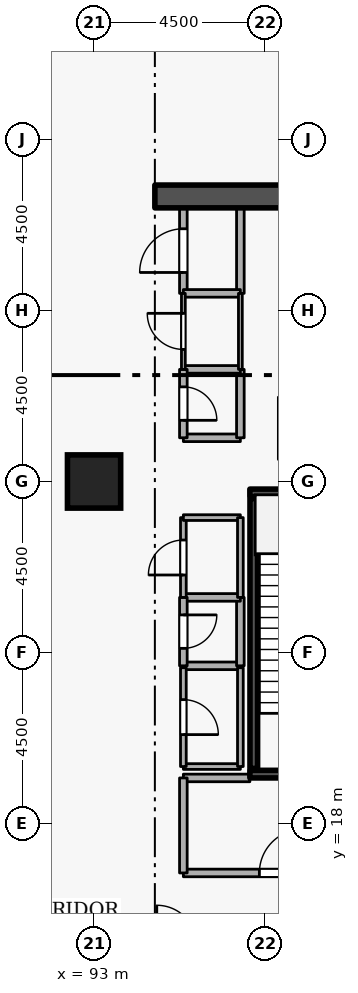
"""IFC4 building model, lengths in metres.
Left out: names, types, materials, properties, quantities, classifications, styles, units other than length and angle.
Written with IfcOpenShell. Run it as: python <this file> out.ifc"""

import sys

from ifc_helpers import new_model, si_unit, direction, frame, frame_2d, origin, origin_2d, place, context, subcontext, project, spatial, rectangle, extrude, element, fill, save


model = new_model("IFC4")
c1 = context("Model", 3, precision=1e-05, world=origin(), true_north=direction((0.0, 1.0)))
c2 = subcontext(c1, "Body", "Model", "MODEL_VIEW")
j1 = project(units=[si_unit("LENGTHUNIT", "METRE"), si_unit("PLANEANGLEUNIT", "RADIAN")], contexts=[c1])
p1 = place(None, origin())
s1 = spatial("IfcSite", under=j1, at=p1, CompositionType="ELEMENT")
p2 = place(p1, origin())
s2 = spatial("IfcBuilding", under=s1, at=p2, CompositionType="ELEMENT")
p3 = place(p2, frame((0.0, 0.0, -5.4)))
s3 = spatial("IfcBuildingStorey", under=s2, at=p3, CompositionType="ELEMENT", Elevation=-5.4)
p4 = place(p3, frame((94.6, 34.5, -0.6), z_axis=(0.0, 0.0, 1.0), x_axis=(1.0, 0.0, 0.0)))
e1 = element("IfcWall", 1, at=p4, inside=s3, PredefinedType="SHEAR", context=c2, shape_type="SweptSolid", body=[
    extrude(rectangle(XDim=5.7, YDim=0.6, at=frame_2d((2.85, 0.0))), origin(), (0.0, 0.0, 1.0), 6.0),
])
p5 = place(p3, frame((93.0, 27.0, -0.6), z_axis=(0.0, 0.0, 1.0), x_axis=(1.0, 0.0, 0.0)))
e2 = element("IfcColumn", 2, at=p5, inside=s3, PredefinedType="COLUMN", context=c2, shape_type="SweptSolid", body=[
    extrude(rectangle(XDim=1.4, YDim=1.4, at=origin_2d()), origin(), (0.0, 0.0, 1.0), 6.0),
])
p6 = place(p3, frame((97.95, 29.22, 0.0), z_axis=(0.0, 0.0, 1.0), x_axis=(0.0, -1.0, 0.0)))
e3 = element("IfcWall", 3, at=p6, inside=s3, PredefinedType="STANDARD", context=c2, shape_type="SweptSolid", body=[
    extrude(rectangle(XDim=1.64, YDim=0.2, at=frame_2d((0.82, 0.0))), origin(), (0.0, 0.0, 1.0), 5.06),
])
p7 = place(p6, frame((0.31, 0.0, 0.0)))
e4 = element("IfcOpeningElement", 4, at=p7, cuts=e3, PredefinedType="OPENING", context=c2, shape_type="SweptSolid", body=[
    extrude(rectangle(XDim=1.02, YDim=2.06, at=frame_2d((0.51, 1.03))), frame((0.0, 0.11, 0.0), z_axis=(0.0, -1.0, 0.0), x_axis=(1.0, 0.0, 0.0)), (0.0, 0.0, 1.0), 0.22),
])
p8 = place(p3, frame((100.45, 19.3, -0.6), z_axis=(0.0, 0.0, 1.0), x_axis=(-1.0, 0.0, 0.0)))
e5 = element("IfcWall", 5, at=p8, inside=s3, PredefinedType="SHEAR", context=c2, shape_type="SweptSolid", body=[
    extrude(rectangle(XDim=3.35, YDim=0.2, at=frame_2d((1.675, 0.0))), origin(), (0.0, 0.0, 1.0), 6.0),
])
p9 = place(p8, frame((1.125, 0.0, 0.6)))
e6 = element("IfcOpeningElement", 6, at=p9, cuts=e5, PredefinedType="OPENING", context=c2, shape_type="SweptSolid", body=[
    extrude(rectangle(XDim=1.1, YDim=2.1, at=frame_2d((0.55, 1.05))), frame((0.0, 0.11, 0.0), z_axis=(0.0, -1.0, 0.0), x_axis=(1.0, 0.0, 0.0)), (0.0, 0.0, 1.0), 0.22),
])
p10 = place(p3, frame((97.1, 26.7, -0.6), z_axis=(0.0, 0.0, 1.0), x_axis=(1.0, 0.0, 0.0)))
e7 = element("IfcWall", 7, at=p10, inside=s3, PredefinedType="SHEAR", context=c2, shape_type="SweptSolid", body=[
    extrude(rectangle(XDim=3.35, YDim=0.2, at=frame_2d((1.675, 0.0))), origin(), (0.0, 0.0, 1.0), 6.0),
])
p11 = place(p3, frame((97.203, 26.55, -0.6), z_axis=(0.0, 0.0, 1.0), x_axis=(0.0, -1.0, 0.0)))
e8 = element("IfcWall", 8, at=p11, inside=s3, PredefinedType="SHEAR", context=c2, shape_type="SweptSolid", body=[
    extrude(rectangle(XDim=7.1, YDim=0.2, at=frame_2d((3.55, 0.0))), origin(), (0.0, 0.0, 1.0), 6.0),
])
p12 = place(p3, frame((95.35, 16.7, 0.0), z_axis=(0.0, 0.0, 1.0), x_axis=(1.0, 0.0, 0.0)))
e9 = element("IfcWall", 9, at=p12, inside=s3, PredefinedType="STANDARD", context=c2, shape_type="SweptSolid", body=[
    extrude(rectangle(XDim=5.15, YDim=0.2, at=frame_2d((2.575, 0.0))), origin(), (0.0, 0.0, 1.0), 5.06),
])
p13 = place(p12, frame((2.0, 0.0, 0.0)))
e10 = element("IfcOpeningElement", 10, at=p13, cuts=e9, PredefinedType="OPENING", context=c2, shape_type="SweptSolid", body=[
    extrude(rectangle(XDim=1.15, YDim=2.1, at=frame_2d((0.575, 1.05))), frame((0.0, 0.11, 0.0), z_axis=(0.0, -1.0, 0.0), x_axis=(1.0, 0.0, 0.0)), (0.0, 0.0, 1.0), 0.22),
])
p14 = place(p3, frame((97.1, 19.2, 0.0), z_axis=(0.0, 0.0, 1.0), x_axis=(-1.0, 0.0, 0.0)))
e11 = element("IfcWall", 11, at=p14, inside=s3, PredefinedType="STANDARD", context=c2, shape_type="SweptSolid", body=[
    extrude(rectangle(XDim=1.75, YDim=0.2, at=frame_2d((0.875, 0.0))), origin(), (0.0, 0.0, 1.0), 4.265),
])
p15 = place(p3, frame((95.35, 19.2, 0.0), z_axis=(0.0, 0.0, 1.0), x_axis=(0.0, -1.0, 0.0)))
e12 = element("IfcWall", 12, at=p15, inside=s3, PredefinedType="STANDARD", context=c2, shape_type="SweptSolid", body=[
    extrude(rectangle(XDim=2.5, YDim=0.2, at=frame_2d((1.25, 0.0))), origin(), (0.0, 0.0, 1.0), 5.06),
])
p16 = place(p3, frame((95.35, 28.15, 0.0), z_axis=(0.0, 0.0, 1.0), x_axis=(1.0, 0.0, 0.0)))
e13 = element("IfcWall", 13, at=p16, inside=s3, PredefinedType="STANDARD", context=c2, shape_type="SweptSolid", body=[
    extrude(rectangle(XDim=1.5, YDim=0.2, at=frame_2d((0.75, 0.0))), origin(), (0.0, 0.0, 1.0), 5.06),
])
p17 = place(p3, frame((96.85, 28.15, 0.0), z_axis=(0.0, 0.0, 1.0), x_axis=(0.0, 1.0, 0.0)))
e14 = element("IfcWall", 14, at=p17, inside=s3, PredefinedType="STANDARD", context=c2, shape_type="SweptSolid", body=[
    extrude(rectangle(XDim=1.8, YDim=0.2, at=frame_2d((0.9, 0.0))), origin(), (0.0, 0.0, 1.0), 5.06),
])
p18 = place(p3, frame((96.85, 29.95, 0.0), z_axis=(0.0, 0.0, 1.0), x_axis=(-1.0, 0.0, 0.0)))
e15 = element("IfcWall", 15, at=p18, inside=s3, PredefinedType="STANDARD", context=c2, shape_type="SweptSolid", body=[
    extrude(rectangle(XDim=1.5, YDim=0.2, at=frame_2d((0.75, 0.0))), origin(), (0.0, 0.0, 1.0), 5.06),
])
p19 = place(p3, frame((95.35, 29.95, 0.0), z_axis=(0.0, 0.0, 1.0), x_axis=(0.0, -1.0, 0.0)))
e16 = element("IfcWall", 16, at=p19, inside=s3, PredefinedType="STANDARD", context=c2, shape_type="SweptSolid", body=[
    extrude(rectangle(XDim=1.8, YDim=0.2, at=frame_2d((0.9, 0.0))), origin(), (0.0, 0.0, 1.0), 5.06),
])
p20 = place(p19, frame((0.46, 0.0, 0.0)))
e17 = element("IfcOpeningElement", 17, at=p20, cuts=e16, PredefinedType="OPENING", context=c2, shape_type="SweptSolid", body=[
    extrude(rectangle(XDim=0.88, YDim=2.04, at=frame_2d((0.44, 1.02))), frame((0.0, 0.11, 0.0), z_axis=(0.0, -1.0, 0.0), x_axis=(1.0, 0.0, 0.0)), (0.0, 0.0, 1.0), 0.22),
])
p21 = place(p3, frame((95.35, 22.15, 0.0), z_axis=(0.0, 0.0, 1.0), x_axis=(1.0, 0.0, 0.0)))
e18 = element("IfcWall", 18, at=p21, inside=s3, PredefinedType="STANDARD", context=c2, shape_type="SweptSolid", body=[
    extrude(rectangle(XDim=1.5, YDim=0.2, at=frame_2d((0.75, 0.0))), origin(), (0.0, 0.0, 1.0), 5.06),
])
p22 = place(p3, frame((96.85, 22.15, 0.0), z_axis=(0.0, 0.0, 1.0), x_axis=(0.0, 1.0, 0.0)))
e19 = element("IfcWall", 19, at=p22, inside=s3, PredefinedType="STANDARD", context=c2, shape_type="SweptSolid", body=[
    extrude(rectangle(XDim=1.8, YDim=0.2, at=frame_2d((0.9, 0.0))), origin(), (0.0, 0.0, 1.0), 5.06),
])
p23 = place(p3, frame((96.85, 23.95, 0.0), z_axis=(0.0, 0.0, 1.0), x_axis=(-1.0, 0.0, 0.0)))
e20 = element("IfcWall", 20, at=p23, inside=s3, PredefinedType="STANDARD", context=c2, shape_type="SweptSolid", body=[
    extrude(rectangle(XDim=1.5, YDim=0.2, at=frame_2d((0.75, 0.0))), origin(), (0.0, 0.0, 1.0), 5.06),
])
p24 = place(p3, frame((95.35, 23.95, 0.0), z_axis=(0.0, 0.0, 1.0), x_axis=(0.0, -1.0, 0.0)))
e21 = element("IfcWall", 21, at=p24, inside=s3, PredefinedType="STANDARD", context=c2, shape_type="SweptSolid", body=[
    extrude(rectangle(XDim=1.8, YDim=0.2, at=frame_2d((0.9, 0.0))), origin(), (0.0, 0.0, 1.0), 5.06),
])
p25 = place(p24, frame((0.46, 0.0, 0.0)))
e22 = element("IfcOpeningElement", 22, at=p25, cuts=e21, PredefinedType="OPENING", context=c2, shape_type="SweptSolid", body=[
    extrude(rectangle(XDim=0.88, YDim=2.04, at=frame_2d((0.44, 1.02))), frame((0.0, 0.11, 0.0), z_axis=(0.0, -1.0, 0.0), x_axis=(1.0, 0.0, 0.0)), (0.0, 0.0, 1.0), 0.22),
])
p26 = place(p3, frame((95.35, 31.95, 0.0), z_axis=(0.0, 0.0, 1.0), x_axis=(0.0, 1.0, 0.0)))
e23 = element("IfcWall", 23, at=p26, inside=s3, PredefinedType="STANDARD", context=c2, shape_type="SweptSolid", body=[
    extrude(rectangle(XDim=2.25, YDim=0.2, at=frame_2d((1.125, 0.0))), origin(), (0.0, 0.0, 1.0), 5.06),
])
p27 = place(p26, frame((0.55, 0.0, 0.0)))
e24 = element("IfcOpeningElement", 24, at=p27, cuts=e23, PredefinedType="OPENING", context=c2, shape_type="SweptSolid", body=[
    extrude(rectangle(XDim=1.15, YDim=2.1, at=frame_2d((0.575, 1.05))), frame((0.0, 0.11, 0.0), z_axis=(0.0, -1.0, 0.0), x_axis=(1.0, 0.0, 0.0)), (0.0, 0.0, 1.0), 0.22),
])
p28 = place(p3, frame((96.85, 34.2, 0.0), z_axis=(0.0, 0.0, 1.0), x_axis=(0.0, -1.0, 0.0)))
e25 = element("IfcWall", 25, at=p28, inside=s3, PredefinedType="STANDARD", context=c2, shape_type="SweptSolid", body=[
    extrude(rectangle(XDim=2.25, YDim=0.2, at=frame_2d((1.125, 0.0))), origin(), (0.0, 0.0, 1.0), 5.06),
])
p29 = place(p3, frame((96.85, 31.95, 0.0), z_axis=(0.0, 0.0, 1.0), x_axis=(-1.0, 0.0, 0.0)))
e26 = element("IfcWall", 26, at=p29, inside=s3, PredefinedType="STANDARD", context=c2, shape_type="SweptSolid", body=[
    extrude(rectangle(XDim=1.5, YDim=0.2, at=frame_2d((0.75, 0.0))), origin(), (0.0, 0.0, 1.0), 5.06),
])
p30 = place(p3, frame((95.35, 19.5, 0.0), z_axis=(0.0, 0.0, 1.0), x_axis=(1.0, 0.0, 0.0)))
e27 = element("IfcWall", 27, at=p30, inside=s3, PredefinedType="PARTITIONING", context=c2, shape_type="SweptSolid", body=[
    extrude(rectangle(XDim=1.5, YDim=0.15, at=frame_2d((0.75, 0.0))), origin(), (0.0, 0.0, 1.0), 4.265),
])
p31 = place(p3, frame((96.85, 19.5, 0.0), z_axis=(0.0, 0.0, 1.0), x_axis=(0.0, 1.0, 0.0)))
e28 = element("IfcWall", 28, at=p31, inside=s3, PredefinedType="PARTITIONING", context=c2, shape_type="SweptSolid", body=[
    extrude(rectangle(XDim=2.6, YDim=0.15, at=frame_2d((1.3, 0.0))), origin(), (0.0, 0.0, 1.0), 5.06),
])
p32 = place(p3, frame((95.35, 22.1, 0.0), z_axis=(0.0, 0.0, 1.0), x_axis=(0.0, -1.0, 0.0)))
e29 = element("IfcWall", 29, at=p32, inside=s3, PredefinedType="PARTITIONING", context=c2, shape_type="SweptSolid", body=[
    extrude(rectangle(XDim=2.6, YDim=0.15, at=frame_2d((1.3, 0.0))), origin(), (0.0, 0.0, 1.0), 5.06),
])
p33 = place(p32, frame((0.84, 0.0, 0.0)))
e30 = element("IfcOpeningElement", 30, at=p33, cuts=e29, PredefinedType="OPENING", context=c2, shape_type="SweptSolid", body=[
    extrude(rectangle(XDim=0.92, YDim=2.08, at=frame_2d((0.46, 1.04))), frame((0.0, 0.085, 0.0), z_axis=(0.0, -1.0, 0.0), x_axis=(1.0, 0.0, 0.0)), (0.0, 0.0, 1.0), 0.17),
])
p34 = place(p3, frame((95.35, 23.95, 0.0), z_axis=(0.0, 0.0, 1.0), x_axis=(0.0, 1.0, 0.0)))
e31 = element("IfcWall", 31, at=p34, inside=s3, PredefinedType="PARTITIONING", context=c2, shape_type="SweptSolid", body=[
    extrude(rectangle(XDim=2.1, YDim=0.15, at=frame_2d((1.05, 0.0))), origin(), (0.0, 0.0, 1.0), 5.06),
])
p35 = place(p34, frame((0.59, 0.0, 0.0)))
e32 = element("IfcOpeningElement", 32, at=p35, cuts=e31, PredefinedType="OPENING", context=c2, shape_type="SweptSolid", body=[
    extrude(rectangle(XDim=0.92, YDim=2.08, at=frame_2d((0.46, 1.04))), frame((0.0, 0.085, 0.0), z_axis=(0.0, -1.0, 0.0), x_axis=(1.0, 0.0, 0.0)), (0.0, 0.0, 1.0), 0.17),
])
p36 = place(p3, frame((95.35, 26.05, 0.0), z_axis=(0.0, 0.0, 1.0), x_axis=(1.0, 0.0, 0.0)))
e33 = element("IfcWall", 33, at=p36, inside=s3, PredefinedType="PARTITIONING", context=c2, shape_type="SweptSolid", body=[
    extrude(rectangle(XDim=1.5, YDim=0.15, at=frame_2d((0.75, 0.0))), origin(), (0.0, 0.0, 1.0), 5.06),
])
p37 = place(p3, frame((96.85, 26.05, 0.0), z_axis=(0.0, 0.0, 1.0), x_axis=(0.0, -1.0, 0.0)))
e34 = element("IfcWall", 34, at=p37, inside=s3, PredefinedType="PARTITIONING", context=c2, shape_type="SweptSolid", body=[
    extrude(rectangle(XDim=2.1, YDim=0.15, at=frame_2d((1.05, 0.0))), origin(), (0.0, 0.0, 1.0), 5.06),
])
p38 = place(p3, frame((95.35, 29.95, 0.0), z_axis=(0.0, 0.0, 1.0), x_axis=(0.0, 1.0, 0.0)))
e35 = element("IfcWall", 35, at=p38, inside=s3, PredefinedType="PARTITIONING", context=c2, shape_type="SweptSolid", body=[
    extrude(rectangle(XDim=2.0, YDim=0.1, at=frame_2d((1.0, 0.0))), origin(), (0.0, 0.0, 1.0), 5.06),
])
p39 = place(p38, frame((0.525, 0.0, 0.0)))
e36 = element("IfcOpeningElement", 36, at=p39, cuts=e35, PredefinedType="OPENING", context=c2, shape_type="SweptSolid", body=[
    extrude(rectangle(XDim=0.95, YDim=2.1, at=frame_2d((0.475, 1.05))), frame((0.0, 0.06, 0.0), z_axis=(0.0, -1.0, 0.0), x_axis=(1.0, 0.0, 0.0)), (0.0, 0.0, 1.0), 0.12),
])
p40 = place(p3, frame((96.85, 31.95, 0.0), z_axis=(0.0, 0.0, 1.0), x_axis=(0.0, -1.0, 0.0)))
e37 = element("IfcWall", 37, at=p40, inside=s3, PredefinedType="PARTITIONING", context=c2, shape_type="SweptSolid", body=[
    extrude(rectangle(XDim=2.0, YDim=0.1, at=frame_2d((1.0, 0.0))), origin(), (0.0, 0.0, 1.0), 5.06),
])
p41 = place(p13, origin())
e38 = element("IfcDoor", 38, at=p41, inside=s3, OperationType="SINGLE_SWING_RIGHT", PredefinedType="DOOR", context=c2, shape_type="SweptSolid", body=[
    extrude(rectangle(XDim=1.15, YDim=2.1, at=frame_2d((0.575, 1.05))), frame((0.0, 0.025, 0.0), z_axis=(0.0, -1.0, 0.0), x_axis=(1.0, 0.0, 0.0)), (0.0, 0.0, 1.0), 0.05),
])
fill(e10, e38)
p42 = place(p20, origin())
e39 = element("IfcDoor", 39, at=p42, inside=s3, OperationType="SINGLE_SWING_RIGHT", PredefinedType="DOOR", context=c2, shape_type="SweptSolid", body=[
    extrude(rectangle(XDim=0.88, YDim=2.04, at=frame_2d((0.44, 1.02))), frame((0.0, 0.025, 0.0), z_axis=(0.0, -1.0, 0.0), x_axis=(1.0, 0.0, 0.0)), (0.0, 0.0, 1.0), 0.05),
])
fill(e17, e39)
p43 = place(p25, origin())
e40 = element("IfcDoor", 40, at=p43, inside=s3, OperationType="SINGLE_SWING_LEFT", PredefinedType="DOOR", context=c2, shape_type="SweptSolid", body=[
    extrude(rectangle(XDim=0.88, YDim=2.04, at=frame_2d((0.44, 1.02))), frame((0.0, 0.025, 0.0), z_axis=(0.0, -1.0, 0.0), x_axis=(1.0, 0.0, 0.0)), (0.0, 0.0, 1.0), 0.05),
])
fill(e22, e40)
p44 = place(p33, origin())
e41 = element("IfcDoor", 41, at=p44, inside=s3, OperationType="SINGLE_SWING_RIGHT", PredefinedType="DOOR", context=c2, shape_type="SweptSolid", body=[
    extrude(rectangle(XDim=0.92, YDim=2.08, at=frame_2d((0.46, 1.04))), frame((0.0, 0.025, 0.0), z_axis=(0.0, -1.0, 0.0), x_axis=(1.0, 0.0, 0.0)), (0.0, 0.0, 1.0), 0.05),
])
fill(e30, e41)
p45 = place(p35, origin())
e42 = element("IfcDoor", 42, at=p45, inside=s3, OperationType="SINGLE_SWING_LEFT", PredefinedType="DOOR", context=c2, shape_type="SweptSolid", body=[
    extrude(rectangle(XDim=0.92, YDim=2.08, at=frame_2d((0.46, 1.04))), frame((0.0, 0.025, 0.0), z_axis=(0.0, -1.0, 0.0), x_axis=(1.0, 0.0, 0.0)), (0.0, 0.0, 1.0), 0.05),
])
fill(e32, e42)
p46 = place(p39, origin())
e43 = element("IfcDoor", 43, at=p46, inside=s3, OperationType="SINGLE_SWING_RIGHT", PredefinedType="DOOR", context=c2, shape_type="SweptSolid", body=[
    extrude(rectangle(XDim=0.95, YDim=2.1, at=frame_2d((0.475, 1.05))), frame((0.0, 0.025, 0.0), z_axis=(0.0, -1.0, 0.0), x_axis=(1.0, 0.0, 0.0)), (0.0, 0.0, 1.0), 0.05),
])
fill(e36, e43)
p47 = place(p27, origin())
e44 = element("IfcDoor", 44, at=p47, inside=s3, OperationType="SINGLE_SWING_LEFT", PredefinedType="DOOR", context=c2, shape_type="SweptSolid", body=[
    extrude(rectangle(XDim=1.15, YDim=2.1, at=frame_2d((0.575, 1.05))), frame((0.0, 0.025, 0.0), z_axis=(0.0, -1.0, 0.0), x_axis=(1.0, 0.0, 0.0)), (0.0, 0.0, 1.0), 0.05),
])
fill(e24, e44)
save(model, sys.argv[1])
